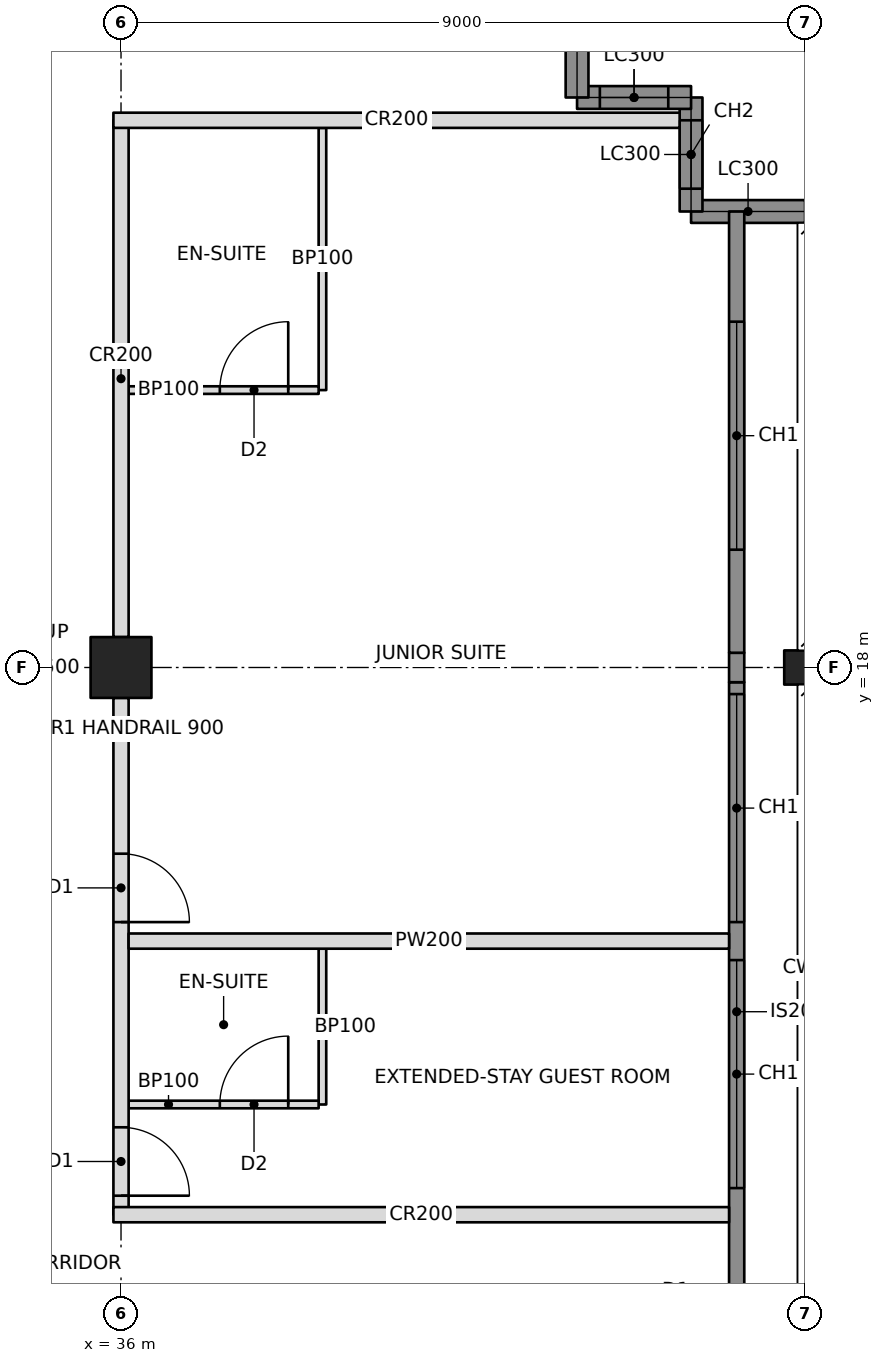
"""IFC4 building model, lengths in metres.
Left out: names, types, materials, properties, quantities, classifications, styles, units other than length and angle.
Written with IfcOpenShell. Run it as: python <this file> out.ifc"""

import sys

from ifc_helpers import new_model, si_unit, direction, frame, frame_2d, origin, origin_2d, place, context, subcontext, project, spatial, rectangle, hollow_rectangle, i_section, extrude, element, fill, save


model = new_model("IFC4")
c1 = context("Model", 3, precision=1e-05, world=origin(), true_north=direction((0.0, 1.0)))
c2 = subcontext(c1, "Body", "Model", "MODEL_VIEW")
j1 = project(units=[si_unit("LENGTHUNIT", "METRE"), si_unit("PLANEANGLEUNIT", "RADIAN")], contexts=[c1])
p1 = place(None, origin())
s1 = spatial("IfcSite", under=j1, at=p1, CompositionType="ELEMENT")
p2 = place(p1, origin())
s2 = spatial("IfcBuilding", under=s1, at=p2, CompositionType="ELEMENT")
p3 = place(p2, frame((0.0, 0.0, 177.4)))
s3 = spatial("IfcBuildingStorey", under=s2, at=p3, CompositionType="ELEMENT", Elevation=177.4)
p4 = place(p3, frame((36.0, 18.0, 0.0), z_axis=(0.0, 0.0, 1.0), x_axis=(0.0, 1.0, 0.0)))
e1 = element("IfcColumn", 1, at=p4, inside=s3, PredefinedType="COLUMN", context=c2, shape_type="SweptSolid", body=[
    extrude(hollow_rectangle(XDim=0.8, YDim=0.8, WallThickness=0.06, at=origin_2d()), origin(), (0.0, 0.0, 1.0), 3.4),
])
p5 = place(p3, frame((45.0, 18.0, 0.0), z_axis=(0.0, 0.0, 1.0), x_axis=(0.0, 1.0, 0.0)))
e2 = element("IfcColumn", 2, at=p5, inside=s3, PredefinedType="COLUMN", context=c2, shape_type="SweptSolid", body=[
    extrude(i_section(OverallWidth=0.449, OverallDepth=0.549, WebThickness=0.072, FlangeThickness=0.115, at=origin_2d()), origin(), (0.0, 0.0, 1.0), 3.4),
])
p6 = place(p3, frame((45.0, 24.0, 0.0), z_axis=(0.0, 0.0, 1.0), x_axis=(-1.0, 0.0, 0.0)))
e3 = element("IfcWall", 3, at=p6, inside=s3, PredefinedType="SOLIDWALL", context=c2, shape_type="SweptSolid", body=[
    extrude(rectangle(XDim=1.5, YDim=0.3, at=frame_2d((0.75, 0.0))), origin(), (0.0, 0.0, 1.0), 2.42),
])
p7 = place(p3, frame((43.5, 24.0, 0.0), z_axis=(0.0, 0.0, 1.0), x_axis=(0.0, 1.0, 0.0)))
e4 = element("IfcWall", 4, at=p7, inside=s3, PredefinedType="SOLIDWALL", context=c2, shape_type="SweptSolid", body=[
    extrude(rectangle(XDim=1.5, YDim=0.3, at=frame_2d((0.75, 0.0))), origin(), (0.0, 0.0, 1.0), 3.2),
])
p8 = place(p7, frame((0.3, 0.0, 0.6)))
e5 = element("IfcOpeningElement", 5, at=p8, cuts=e4, PredefinedType="OPENING", context=c2, shape_type="SweptSolid", body=[
    extrude(rectangle(XDim=0.9, YDim=2.2, at=frame_2d((0.45, 1.1))), frame((0.0, 0.16, 0.0), z_axis=(0.0, -1.0, 0.0), x_axis=(1.0, 0.0, 0.0)), (0.0, 0.0, 1.0), 0.32),
])
p9 = place(p3, frame((43.5, 25.5, 0.0), z_axis=(0.0, 0.0, 1.0), x_axis=(-1.0, 0.0, 0.0)))
e6 = element("IfcWall", 6, at=p9, inside=s3, PredefinedType="SOLIDWALL", context=c2, shape_type="SweptSolid", body=[
    extrude(rectangle(XDim=1.5, YDim=0.3, at=frame_2d((0.75, 0.0))), origin(), (0.0, 0.0, 1.0), 3.2),
])
p10 = place(p9, frame((0.3, 0.0, 0.6)))
e7 = element("IfcOpeningElement", 7, at=p10, cuts=e6, PredefinedType="OPENING", context=c2, shape_type="SweptSolid", body=[
    extrude(rectangle(XDim=0.9, YDim=2.2, at=frame_2d((0.45, 1.1))), frame((0.0, 0.16, 0.0), z_axis=(0.0, -1.0, 0.0), x_axis=(1.0, 0.0, 0.0)), (0.0, 0.0, 1.0), 0.32),
])
p11 = place(p3, frame((42.0, 25.5, 0.0), z_axis=(0.0, 0.0, 1.0), x_axis=(0.0, 1.0, 0.0)))
e8 = element("IfcWall", 8, at=p11, inside=s3, PredefinedType="SOLIDWALL", context=c2, shape_type="SweptSolid", body=[
    extrude(rectangle(XDim=1.5, YDim=0.3, at=frame_2d((0.75, 0.0))), origin(), (0.0, 0.0, 1.0), 2.42),
])
p12 = place(p3, frame((36.0, 10.8, 0.0), z_axis=(0.0, 0.0, 1.0), x_axis=(0.0, 1.0, 0.0)))
e9 = element("IfcWall", 9, at=p12, inside=s3, PredefinedType="PARTITIONING", context=c2, shape_type="SweptSolid", body=[
    extrude(rectangle(XDim=6.8, YDim=0.2, at=frame_2d((3.4, 0.0))), origin(), (0.0, 0.0, 1.0), 2.405),
])
p13 = place(p12, frame((0.25, 0.0, 0.0)))
e10 = element("IfcOpeningElement", 10, at=p13, cuts=e9, PredefinedType="OPENING", context=c2, shape_type="SweptSolid", body=[
    extrude(rectangle(XDim=0.9, YDim=2.1, at=frame_2d((0.45, 1.05))), frame((0.0, 0.11, 0.0), z_axis=(0.0, -1.0, 0.0), x_axis=(1.0, 0.0, 0.0)), (0.0, 0.0, 1.0), 0.22),
])
p14 = place(p12, frame((3.85, 0.0, 0.0)))
e11 = element("IfcOpeningElement", 11, at=p14, cuts=e9, PredefinedType="OPENING", context=c2, shape_type="SweptSolid", body=[
    extrude(rectangle(XDim=0.9, YDim=2.1, at=frame_2d((0.45, 1.05))), frame((0.0, 0.11, 0.0), z_axis=(0.0, -1.0, 0.0), x_axis=(1.0, 0.0, 0.0)), (0.0, 0.0, 1.0), 0.22),
])
p15 = place(p3, frame((36.0, 18.4, 0.0), z_axis=(0.0, 0.0, 1.0), x_axis=(0.0, 1.0, 0.0)))
e12 = element("IfcWall", 12, at=p15, inside=s3, PredefinedType="PARTITIONING", context=c2, shape_type="SweptSolid", body=[
    extrude(rectangle(XDim=6.8, YDim=0.2, at=frame_2d((3.4, 0.0))), origin(), (0.0, 0.0, 1.0), 2.405),
])
p16 = place(p3, frame((35.9, 10.8, 0.0), z_axis=(0.0, 0.0, 1.0), x_axis=(1.0, 0.0, 0.0)))
e13 = element("IfcWall", 13, at=p16, inside=s3, PredefinedType="PARTITIONING", context=c2, shape_type="SweptSolid", body=[
    extrude(rectangle(XDim=8.1, YDim=0.2, at=frame_2d((4.05, 0.0))), origin(), (0.0, 0.0, 1.0), 2.404),
])
p17 = place(p3, frame((35.9, 25.2, 0.0), z_axis=(0.0, 0.0, 1.0), x_axis=(1.0, 0.0, 0.0)))
e14 = element("IfcWall", 14, at=p17, inside=s3, PredefinedType="PARTITIONING", context=c2, shape_type="SweptSolid", body=[
    extrude(rectangle(XDim=7.45, YDim=0.2, at=frame_2d((3.725, 0.0))), origin(), (0.0, 0.0, 1.0), 2.404),
])
p18 = place(p3, frame((36.1, 14.4, 0.0), z_axis=(0.0, 0.0, 1.0), x_axis=(1.0, 0.0, 0.0)))
e15 = element("IfcWall", 15, at=p18, inside=s3, PredefinedType="PARTITIONING", context=c2, shape_type="SweptSolid", body=[
    extrude(rectangle(XDim=7.9, YDim=0.2, at=frame_2d((3.95, 0.0))), origin(), (0.0, 0.0, 1.0), 2.404),
])
p19 = place(p3, frame((38.65, 12.25, 0.0), z_axis=(0.0, 0.0, 1.0), x_axis=(0.0, 1.0, 0.0)))
e16 = element("IfcWall", 16, at=p19, inside=s3, PredefinedType="PARTITIONING", context=c2, shape_type="SweptSolid", body=[
    extrude(rectangle(XDim=2.05, YDim=0.1, at=frame_2d((1.025, 0.0))), origin(), (0.0, 0.0, 1.0), 3.2),
])
p20 = place(p3, frame((36.1, 12.25, 0.0), z_axis=(0.0, 0.0, 1.0), x_axis=(1.0, 0.0, 0.0)))
e17 = element("IfcWall", 17, at=p20, inside=s3, PredefinedType="PARTITIONING", context=c2, shape_type="SweptSolid", body=[
    extrude(rectangle(XDim=2.5, YDim=0.1, at=frame_2d((1.25, 0.0))), origin(), (0.0, 0.0, 1.0), 2.404),
])
p21 = place(p20, frame((1.2, 0.0, 0.0)))
e18 = element("IfcOpeningElement", 18, at=p21, cuts=e17, PredefinedType="OPENING", context=c2, shape_type="SweptSolid", body=[
    extrude(rectangle(XDim=0.9, YDim=2.1, at=frame_2d((0.45, 1.05))), frame((0.0, 0.06, 0.0), z_axis=(0.0, -1.0, 0.0), x_axis=(1.0, 0.0, 0.0)), (0.0, 0.0, 1.0), 0.12),
])
p22 = place(p3, frame((38.65, 21.65, 0.0), z_axis=(0.0, 0.0, 1.0), x_axis=(0.0, 1.0, 0.0)))
e19 = element("IfcWall", 19, at=p22, inside=s3, PredefinedType="PARTITIONING", context=c2, shape_type="SweptSolid", body=[
    extrude(rectangle(XDim=3.45, YDim=0.1, at=frame_2d((1.725, 0.0))), origin(), (0.0, 0.0, 1.0), 3.2),
])
p23 = place(p3, frame((36.1, 21.65, 0.0), z_axis=(0.0, 0.0, 1.0), x_axis=(1.0, 0.0, 0.0)))
e20 = element("IfcWall", 20, at=p23, inside=s3, PredefinedType="PARTITIONING", context=c2, shape_type="SweptSolid", body=[
    extrude(rectangle(XDim=2.5, YDim=0.1, at=frame_2d((1.25, 0.0))), origin(), (0.0, 0.0, 1.0), 2.404),
])
p24 = place(p23, frame((1.2, 0.0, 0.0)))
e21 = element("IfcOpeningElement", 21, at=p24, cuts=e20, PredefinedType="OPENING", context=c2, shape_type="SweptSolid", body=[
    extrude(rectangle(XDim=0.9, YDim=2.1, at=frame_2d((0.45, 1.05))), frame((0.0, 0.06, 0.0), z_axis=(0.0, -1.0, 0.0), x_axis=(1.0, 0.0, 0.0)), (0.0, 0.0, 1.0), 0.12),
])
p25 = place(p3, frame((44.1, 9.135, 0.0), z_axis=(0.0, 0.0, 1.0), x_axis=(0.0, 1.0, 0.0)))
e22 = element("IfcWall", 22, at=p25, inside=s3, PredefinedType="SOLIDWALL", context=c2, shape_type="SweptSolid", body=[
    extrude(rectangle(XDim=8.671, YDim=0.2, at=frame_2d((4.335, 0.0))), origin(), (0.0, 0.0, 1.0), 3.2),
])
p26 = place(p25, frame((2.015, 0.0, 0.6)))
e23 = element("IfcOpeningElement", 23, at=p26, cuts=e22, PredefinedType="OPENING", context=c2, shape_type="SweptSolid", body=[
    extrude(rectangle(XDim=3.0, YDim=2.2, at=frame_2d((1.5, 1.1))), frame((0.0, 0.11, 0.0), z_axis=(0.0, -1.0, 0.0), x_axis=(1.0, 0.0, 0.0)), (0.0, 0.0, 1.0), 0.22),
])
p27 = place(p25, frame((5.515, 0.0, 0.6)))
e24 = element("IfcOpeningElement", 24, at=p27, cuts=e22, PredefinedType="OPENING", context=c2, shape_type="SweptSolid", body=[
    extrude(rectangle(XDim=3.0, YDim=2.2, at=frame_2d((1.5, 1.1))), frame((0.0, 0.11, 0.0), z_axis=(0.0, -1.0, 0.0), x_axis=(1.0, 0.0, 0.0)), (0.0, 0.0, 1.0), 0.22),
])
p28 = place(p3, frame((44.1, 17.806, 0.0), z_axis=(0.0, 0.0, 1.0), x_axis=(0.0, 1.0, 0.0)))
e25 = element("IfcWall", 25, at=p28, inside=s3, PredefinedType="SOLIDWALL", context=c2, shape_type="SweptSolid", body=[
    extrude(rectangle(XDim=0.388, YDim=0.2, at=frame_2d((0.194, 0.0))), origin(), (0.0, 0.0, 1.0), 2.404),
])
p29 = place(p3, frame((44.1, 18.194, 0.0), z_axis=(0.0, 0.0, 1.0), x_axis=(0.0, 1.0, 0.0)))
e26 = element("IfcWall", 26, at=p29, inside=s3, PredefinedType="SOLIDWALL", context=c2, shape_type="SweptSolid", body=[
    extrude(rectangle(XDim=5.806, YDim=0.2, at=frame_2d((2.903, 0.0))), origin(), (0.0, 0.0, 1.0), 3.2),
])
p30 = place(p29, frame((1.356, 0.0, 0.6)))
e27 = element("IfcOpeningElement", 27, at=p30, cuts=e26, PredefinedType="OPENING", context=c2, shape_type="SweptSolid", body=[
    extrude(rectangle(XDim=3.0, YDim=2.2, at=frame_2d((1.5, 1.1))), frame((0.0, 0.11, 0.0), z_axis=(0.0, -1.0, 0.0), x_axis=(1.0, 0.0, 0.0)), (0.0, 0.0, 1.0), 0.22),
])
p31 = place(p8, origin())
e28 = element("IfcWindow", 28, at=p31, inside=s3, PartitioningType="SINGLE_PANEL", PredefinedType="WINDOW", context=c2, shape_type="SweptSolid", body=[
    extrude(rectangle(XDim=0.9, YDim=2.2, at=frame_2d((0.45, 1.1))), frame((0.0, 0.03, 0.0), z_axis=(0.0, -1.0, 0.0), x_axis=(1.0, 0.0, 0.0)), (0.0, 0.0, 1.0), 0.06),
])
fill(e5, e28)
p32 = place(p10, origin())
e29 = element("IfcWindow", 29, at=p32, inside=s3, PartitioningType="SINGLE_PANEL", PredefinedType="WINDOW", context=c2, shape_type="SweptSolid", body=[
    extrude(rectangle(XDim=0.9, YDim=2.2, at=frame_2d((0.45, 1.1))), frame((0.0, 0.03, 0.0), z_axis=(0.0, -1.0, 0.0), x_axis=(1.0, 0.0, 0.0)), (0.0, 0.0, 1.0), 0.06),
])
fill(e7, e29)
p33 = place(p26, origin())
e30 = element("IfcWindow", 30, at=p33, inside=s3, PartitioningType="TRIPLE_PANEL_VERTICAL", PredefinedType="WINDOW", context=c2, shape_type="SweptSolid", body=[
    extrude(rectangle(XDim=3.0, YDim=2.2, at=frame_2d((1.5, 1.1))), frame((0.0, 0.03, 0.0), z_axis=(0.0, -1.0, 0.0), x_axis=(1.0, 0.0, 0.0)), (0.0, 0.0, 1.0), 0.06),
])
fill(e23, e30)
p34 = place(p27, origin())
e31 = element("IfcWindow", 31, at=p34, inside=s3, PartitioningType="TRIPLE_PANEL_VERTICAL", PredefinedType="WINDOW", context=c2, shape_type="SweptSolid", body=[
    extrude(rectangle(XDim=3.0, YDim=2.2, at=frame_2d((1.5, 1.1))), frame((0.0, 0.03, 0.0), z_axis=(0.0, -1.0, 0.0), x_axis=(1.0, 0.0, 0.0)), (0.0, 0.0, 1.0), 0.06),
])
fill(e24, e31)
p35 = place(p30, origin())
e32 = element("IfcWindow", 32, at=p35, inside=s3, PartitioningType="TRIPLE_PANEL_VERTICAL", PredefinedType="WINDOW", context=c2, shape_type="SweptSolid", body=[
    extrude(rectangle(XDim=3.0, YDim=2.2, at=frame_2d((1.5, 1.1))), frame((0.0, 0.03, 0.0), z_axis=(0.0, -1.0, 0.0), x_axis=(1.0, 0.0, 0.0)), (0.0, 0.0, 1.0), 0.06),
])
fill(e27, e32)
p36 = place(p21, origin())
e33 = element("IfcDoor", 33, at=p36, inside=s3, OperationType="SINGLE_SWING_RIGHT", PredefinedType="DOOR", context=c2, shape_type="SweptSolid", body=[
    extrude(rectangle(XDim=0.9, YDim=2.1, at=frame_2d((0.45, 1.05))), frame((0.0, 0.025, 0.0), z_axis=(0.0, -1.0, 0.0), x_axis=(1.0, 0.0, 0.0)), (0.0, 0.0, 1.0), 0.05),
])
fill(e18, e33)
p37 = place(p13, frame((0.9, 0.0, 0.0), z_axis=(0.0, 0.0, 1.0), x_axis=(-1.0, 0.0, 0.0)))
e34 = element("IfcDoor", 34, at=p37, inside=s3, OperationType="SINGLE_SWING_RIGHT", PredefinedType="DOOR", context=c2, shape_type="SweptSolid", body=[
    extrude(rectangle(XDim=0.9, YDim=2.1, at=frame_2d((0.45, 1.05))), frame((0.0, 0.025, 0.0), z_axis=(0.0, -1.0, 0.0), x_axis=(1.0, 0.0, 0.0)), (0.0, 0.0, 1.0), 0.05),
])
fill(e10, e34)
p38 = place(p24, origin())
e35 = element("IfcDoor", 35, at=p38, inside=s3, OperationType="SINGLE_SWING_RIGHT", PredefinedType="DOOR", context=c2, shape_type="SweptSolid", body=[
    extrude(rectangle(XDim=0.9, YDim=2.1, at=frame_2d((0.45, 1.05))), frame((0.0, 0.025, 0.0), z_axis=(0.0, -1.0, 0.0), x_axis=(1.0, 0.0, 0.0)), (0.0, 0.0, 1.0), 0.05),
])
fill(e21, e35)
p39 = place(p14, frame((0.9, 0.0, 0.0), z_axis=(0.0, 0.0, 1.0), x_axis=(-1.0, 0.0, 0.0)))
e36 = element("IfcDoor", 36, at=p39, inside=s3, OperationType="SINGLE_SWING_RIGHT", PredefinedType="DOOR", context=c2, shape_type="SweptSolid", body=[
    extrude(rectangle(XDim=0.9, YDim=2.1, at=frame_2d((0.45, 1.05))), frame((0.0, 0.025, 0.0), z_axis=(0.0, -1.0, 0.0), x_axis=(1.0, 0.0, 0.0)), (0.0, 0.0, 1.0), 0.05),
])
fill(e11, e36)
save(model, sys.argv[1])
